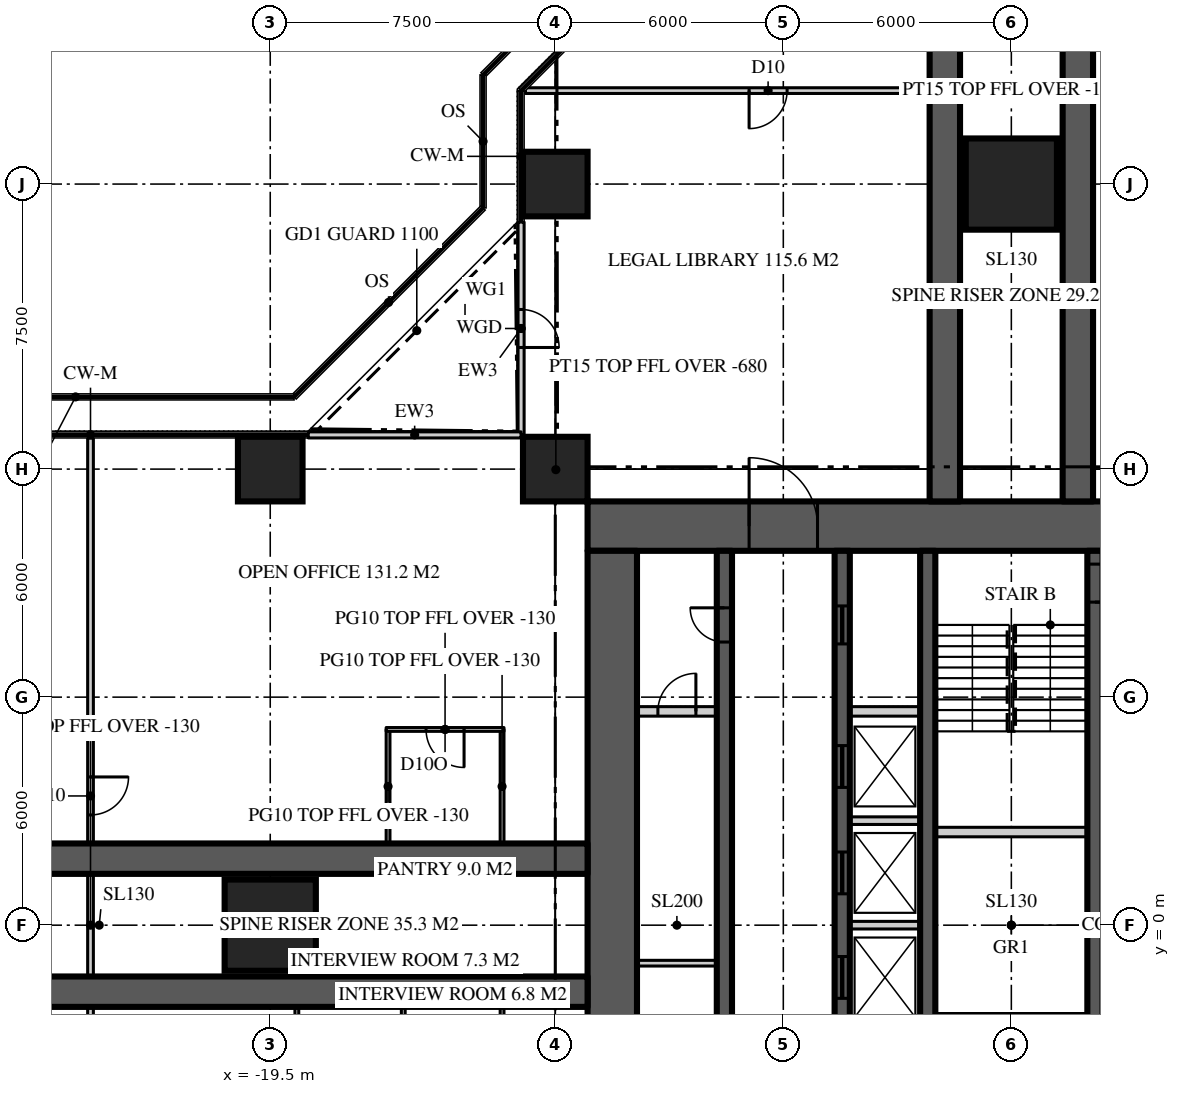
"""IFC4 building model, lengths in metres.
Left out: names, types, materials, properties, quantities, classifications, styles, units other than length and angle.
Written with IfcOpenShell. Run it as: python <this file> out.ifc"""

import sys

from ifc_helpers import new_model, si_unit, direction, frame, frame_2d, origin, origin_2d, place, context, subcontext, project, spatial, rectangle, extrude, element, fill, save


model = new_model("IFC4")
c1 = context("Model", 3, precision=1e-05, world=origin(), true_north=direction((0.0, 1.0)))
c2 = subcontext(c1, "Body", "Model", "MODEL_VIEW")
j1 = project(units=[si_unit("LENGTHUNIT", "METRE"), si_unit("PLANEANGLEUNIT", "RADIAN")], contexts=[c1])
p1 = place(None, origin())
s1 = spatial("IfcSite", under=j1, at=p1, CompositionType="ELEMENT")
p2 = place(p1, origin())
s2 = spatial("IfcBuilding", under=s1, at=p2, CompositionType="ELEMENT")
p3 = place(p2, frame((0.0, 0.0, 143.7)))
s3 = spatial("IfcBuildingStorey", under=s2, at=p3, CompositionType="ELEMENT", Elevation=143.7)
p4 = place(p3, frame((-11.15, 10.5, 0.0), z_axis=(0.0, 0.0, 1.0), x_axis=(1.0, 0.0, 0.0)))
e1 = element("IfcWall", 1, at=p4, inside=s3, PredefinedType="SHEAR", context=c2, shape_type="SweptSolid", body=[
    extrude(rectangle(XDim=22.3, YDim=1.3, at=frame_2d((11.15, 0.0))), origin(), (0.0, 0.0, 1.0), 3.9),
])
p5 = place(p4, frame((4.25, 0.0, 0.0)))
e2 = element("IfcOpeningElement", 2, at=p5, cuts=e1, PredefinedType="OPENING", context=c2, shape_type="SweptSolid", body=[
    extrude(rectangle(XDim=1.8, YDim=2.2, at=frame_2d((0.9, 1.1))), frame((0.0, 0.66, 0.0), z_axis=(0.0, -1.0, 0.0), x_axis=(1.0, 0.0, 0.0)), (0.0, 0.0, 1.0), 1.32),
])
p6 = place(p4, frame((16.25, 0.0, 0.0)))
e3 = element("IfcOpeningElement", 3, at=p6, cuts=e1, PredefinedType="OPENING", context=c2, shape_type="SweptSolid", body=[
    extrude(rectangle(XDim=1.8, YDim=2.2, at=frame_2d((0.9, 1.1))), frame((0.0, 0.66, 0.0), z_axis=(0.0, -1.0, 0.0), x_axis=(1.0, 0.0, 0.0)), (0.0, 0.0, 1.0), 1.32),
])
p7 = place(p3, frame((-10.5, 9.85, 0.0), z_axis=(0.0, 0.0, 1.0), x_axis=(0.0, -1.0, 0.0)))
e4 = element("IfcWall", 4, at=p7, inside=s3, PredefinedType="SHEAR", context=c2, shape_type="SweptSolid", body=[
    extrude(rectangle(XDim=19.7, YDim=1.3, at=frame_2d((9.85, 0.0))), origin(), (0.0, 0.0, 1.0), 3.9),
])
p8 = place(p7, frame((17.25, 0.0, 0.0)))
e5 = element("IfcOpeningElement", 5, at=p8, cuts=e4, PredefinedType="OPENING", context=c2, shape_type="SweptSolid", body=[
    extrude(rectangle(XDim=1.0, YDim=2.2, at=frame_2d((0.5, 1.1))), frame((0.0, 0.66, 0.0), z_axis=(0.0, -1.0, 0.0), x_axis=(1.0, 0.0, 0.0)), (0.0, 0.0, 1.0), 1.32),
])
for number, where, z_axis, x_axis in (
    (6, (1.75, 11.15, 0.0), (0.0, 0.0, 1.0), (0.0, 1.0, 0.0)),
    (7, (-1.75, 11.15, 0.0), (0.0, 0.0, 1.0), (0.0, 1.0, 0.0)),
    (8, (-11.15, 1.75, 0.0), (0.0, 0.0, 1.0), (-1.0, 0.0, 0.0)),
    (9, (-11.15, -1.75, 0.0), (0.0, 0.0, 1.0), (-1.0, 0.0, 0.0)),
):
    element("IfcWall", number, at=place(p3, frame(where, z_axis=z_axis, x_axis=x_axis)), inside=s3, PredefinedType="SHEAR", context=c2, shape_type="SweptSolid", body=[
        extrude(rectangle(XDim=15.25, YDim=0.8, at=frame_2d((7.625, 0.0))), origin(), (0.0, 0.0, 1.0), 3.9),
    ])
p9 = place(p3, frame((-19.5, 0.0, 0.0), z_axis=(0.0, 0.0, 1.0), x_axis=(1.0, 0.0, 0.0)))
e10 = element("IfcColumn", 10, at=p9, inside=s3, PredefinedType="COLUMN", context=c2, shape_type="SweptSolid", body=[
    extrude(rectangle(XDim=2.4, YDim=2.4, at=origin_2d()), origin(), (0.0, 0.0, 1.0), 3.9),
])
for number, where, z_axis, x_axis in (
    (11, (-19.5, 12.0, 0.0), (0.0, 0.0, 1.0), (1.0, 0.0, 0.0)),
    (12, (-12.0, 12.0, 0.0), (0.0, 0.0, 1.0), (1.0, 0.0, 0.0)),
    (13, (-12.0, 19.5, 0.0), (0.0, 0.0, 1.0), (1.0, 0.0, 0.0)),
):
    element("IfcColumn", number, at=place(p3, frame(where, z_axis=z_axis, x_axis=x_axis)), inside=s3, PredefinedType="COLUMN", context=c2, shape_type="SweptSolid", body=[
        extrude(rectangle(XDim=1.7, YDim=1.7, at=origin_2d()), origin(), (0.0, 0.0, 1.0), 3.9),
    ])
p10 = place(p3, frame((0.0, 19.5, 0.0), z_axis=(0.0, 0.0, 1.0), x_axis=(1.0, 0.0, 0.0)))
e14 = element("IfcColumn", 14, at=p10, inside=s3, PredefinedType="COLUMN", context=c2, shape_type="SweptSolid", body=[
    extrude(rectangle(XDim=2.4, YDim=2.4, at=origin_2d()), origin(), (0.0, 0.0, 1.0), 3.9),
])
p11 = place(p3, frame((-12.9, 18.5, 0.0), z_axis=(0.0, 0.0, 1.0), x_axis=(0.0, -1.0, 0.0)))
e15 = element("IfcWall", 15, at=p11, inside=s3, PredefinedType="SOLIDWALL", context=c2, shape_type="SweptSolid", body=[
    extrude(rectangle(XDim=5.6, YDim=0.16, at=frame_2d((2.8, 0.0))), origin(), (0.0, 0.0, 1.0), 3.77),
])
p12 = place(p11, frame((2.3, 0.0, 0.0)))
e16 = element("IfcOpeningElement", 16, at=p12, cuts=e15, PredefinedType="OPENING", context=c2, shape_type="SweptSolid", body=[
    extrude(rectangle(XDim=1.0, YDim=2.2, at=frame_2d((0.5, 1.1))), frame((0.0, 0.09, 0.0), z_axis=(0.0, -1.0, 0.0), x_axis=(1.0, 0.0, 0.0)), (0.0, 0.0, 1.0), 0.18),
])
p13 = place(p3, frame((-12.9, 12.9, 0.0), z_axis=(0.0, 0.0, 1.0), x_axis=(-1.0, 0.0, 0.0)))
e17 = element("IfcWall", 17, at=p13, inside=s3, PredefinedType="SOLIDWALL", context=c2, shape_type="SweptSolid", body=[
    extrude(rectangle(XDim=5.6, YDim=0.16, at=frame_2d((2.8, 0.0))), origin(), (0.0, 0.0, 1.0), 3.77),
])
p14 = place(p3, frame((-7.55, -9.85, 0.0), z_axis=(0.0, 0.0, 1.0), x_axis=(0.0, 1.0, 0.0)))
e18 = element("IfcWall", 18, at=p14, inside=s3, PredefinedType="SHEAR", context=c2, shape_type="SweptSolid", body=[
    extrude(rectangle(XDim=19.7, YDim=0.4, at=frame_2d((9.85, 0.0))), origin(), (0.0, 0.0, 1.0), 3.9),
])
p15 = place(p14, frame((1.45, 0.0, 0.0)))
e19 = element("IfcOpeningElement", 19, at=p15, cuts=e18, PredefinedType="OPENING", context=c2, shape_type="SweptSolid", body=[
    extrude(rectangle(XDim=1.0, YDim=2.2, at=frame_2d((0.5, 1.1))), frame((0.0, 0.21, 0.0), z_axis=(0.0, -1.0, 0.0), x_axis=(1.0, 0.0, 0.0)), (0.0, 0.0, 1.0), 0.42),
])
p16 = place(p14, frame((17.3, 0.0, 0.0)))
e20 = element("IfcOpeningElement", 20, at=p16, cuts=e18, PredefinedType="OPENING", context=c2, shape_type="SweptSolid", body=[
    extrude(rectangle(XDim=0.9, YDim=2.1, at=frame_2d((0.45, 1.05))), frame((0.0, 0.21, 0.0), z_axis=(0.0, -1.0, 0.0), x_axis=(1.0, 0.0, 0.0)), (0.0, 0.0, 1.0), 0.42),
])
p17 = place(p3, frame((-4.45, -9.85, 0.0), z_axis=(0.0, 0.0, 1.0), x_axis=(0.0, 1.0, 0.0)))
e21 = element("IfcWall", 21, at=p17, inside=s3, PredefinedType="SHEAR", context=c2, shape_type="SweptSolid", body=[
    extrude(rectangle(XDim=19.7, YDim=0.4, at=frame_2d((9.85, 0.0))), origin(), (0.0, 0.0, 1.0), 3.9),
])
p18 = place(p17, frame((1.95, 0.0, 0.0)))
e22 = element("IfcOpeningElement", 22, at=p18, cuts=e21, PredefinedType="OPENING", context=c2, shape_type="SweptSolid", body=[
    extrude(rectangle(XDim=1.0, YDim=2.2, at=frame_2d((0.5, 1.1))), frame((0.0, 0.21, 0.0), z_axis=(0.0, -1.0, 0.0), x_axis=(1.0, 0.0, 0.0)), (0.0, 0.0, 1.0), 0.42),
])
p19 = place(p17, frame((17.25, 0.0, 0.0)))
e23 = element("IfcOpeningElement", 23, at=p19, cuts=e21, PredefinedType="OPENING", context=c2, shape_type="SweptSolid", body=[
    extrude(rectangle(XDim=1.0, YDim=2.1, at=frame_2d((0.5, 1.05))), frame((0.0, 0.21, 0.0), z_axis=(0.0, -1.0, 0.0), x_axis=(1.0, 0.0, 0.0)), (0.0, 0.0, 1.0), 0.42),
])
p20 = place(p17, frame((7.925, 0.0, 0.0)))
e24 = element("IfcOpeningElement", 24, at=p20, cuts=e21, PredefinedType="OPENING", context=c2, shape_type="SweptSolid", body=[
    extrude(rectangle(XDim=1.1, YDim=2.2, at=frame_2d((0.55, 1.1))), frame((0.0, 0.21, 0.0), z_axis=(0.0, -1.0, 0.0), x_axis=(1.0, 0.0, 0.0)), (0.0, 0.0, 1.0), 0.42),
])
p21 = place(p17, frame((10.675, 0.0, 0.0)))
e25 = element("IfcOpeningElement", 25, at=p21, cuts=e21, PredefinedType="OPENING", context=c2, shape_type="SweptSolid", body=[
    extrude(rectangle(XDim=1.1, YDim=2.2, at=frame_2d((0.55, 1.1))), frame((0.0, 0.21, 0.0), z_axis=(0.0, -1.0, 0.0), x_axis=(1.0, 0.0, 0.0)), (0.0, 0.0, 1.0), 0.42),
])
p22 = place(p17, frame((13.475, 0.0, 0.0)))
e26 = element("IfcOpeningElement", 26, at=p22, cuts=e21, PredefinedType="OPENING", context=c2, shape_type="SweptSolid", body=[
    extrude(rectangle(XDim=1.1, YDim=2.2, at=frame_2d((0.55, 1.1))), frame((0.0, 0.21, 0.0), z_axis=(0.0, -1.0, 0.0), x_axis=(1.0, 0.0, 0.0)), (0.0, 0.0, 1.0), 0.42),
])
p23 = place(p3, frame((-2.2, -9.85, 0.0), z_axis=(0.0, 0.0, 1.0), x_axis=(0.0, 1.0, 0.0)))
e27 = element("IfcWall", 27, at=p23, inside=s3, PredefinedType="SHEAR", context=c2, shape_type="SweptSolid", body=[
    extrude(rectangle(XDim=19.7, YDim=0.4, at=frame_2d((9.85, 0.0))), origin(), (0.0, 0.0, 1.0), 3.9),
])
p24 = place(p23, frame((0.35, 0.0, 0.0)))
e28 = element("IfcOpeningElement", 28, at=p24, cuts=e27, PredefinedType="OPENING", context=c2, shape_type="SweptSolid", body=[
    extrude(rectangle(XDim=1.0, YDim=2.2, at=frame_2d((0.5, 1.1))), frame((0.0, 0.21, 0.0), z_axis=(0.0, -1.0, 0.0), x_axis=(1.0, 0.0, 0.0)), (0.0, 0.0, 1.0), 0.42),
])
p25 = place(p3, frame((2.2, 9.85, 0.0), z_axis=(0.0, 0.0, 1.0), x_axis=(0.0, -1.0, 0.0)))
e29 = element("IfcWall", 29, at=p25, inside=s3, PredefinedType="SHEAR", context=c2, shape_type="SweptSolid", body=[
    extrude(rectangle(XDim=19.7, YDim=0.4, at=frame_2d((9.85, 0.0))), origin(), (0.0, 0.0, 1.0), 3.9),
])
p26 = place(p25, frame((0.35, 0.0, 0.0)))
e30 = element("IfcOpeningElement", 30, at=p26, cuts=e29, PredefinedType="OPENING", context=c2, shape_type="SweptSolid", body=[
    extrude(rectangle(XDim=1.0, YDim=2.2, at=frame_2d((0.5, 1.1))), frame((0.0, 0.21, 0.0), z_axis=(0.0, -1.0, 0.0), x_axis=(1.0, 0.0, 0.0)), (0.0, 0.0, 1.0), 0.42),
])
p27 = place(p3, frame((-9.85, 5.625, 0.0), z_axis=(0.0, 0.0, 1.0), x_axis=(1.0, 0.0, 0.0)))
e31 = element("IfcWall", 31, at=p27, inside=s3, PredefinedType="SOLIDWALL", context=c2, shape_type="SweptSolid", body=[
    extrude(rectangle(XDim=2.1, YDim=0.25, at=frame_2d((1.05, 0.0))), origin(), (0.0, 0.0, 1.0), 3.7),
])
p28 = place(p27, frame((0.55, 0.0, 0.0)))
e32 = element("IfcOpeningElement", 32, at=p28, cuts=e31, PredefinedType="OPENING", context=c2, shape_type="SweptSolid", body=[
    extrude(rectangle(XDim=1.0, YDim=2.2, at=frame_2d((0.5, 1.1))), frame((0.0, 0.135, 0.0), z_axis=(0.0, -1.0, 0.0), x_axis=(1.0, 0.0, 0.0)), (0.0, 0.0, 1.0), 0.27),
])
p29 = place(p3, frame((-4.25, 5.625, 0.0), z_axis=(0.0, 0.0, 1.0), x_axis=(1.0, 0.0, 0.0)))
e33 = element("IfcWall", 33, at=p29, inside=s3, PredefinedType="SOLIDWALL", context=c2, shape_type="SweptSolid", body=[
    extrude(rectangle(XDim=1.85, YDim=0.25, at=frame_2d((0.925, 0.0))), origin(), (0.0, 0.0, 1.0), 3.7),
])
for number, where, z_axis, x_axis in (
    (34, (-2.0, -2.45, 0.0), (0.0, 0.0, 1.0), (1.0, 0.0, 0.0)),
    (35, (-2.0, 2.45, 0.0), (0.0, 0.0, 1.0), (1.0, 0.0, 0.0)),
):
    element("IfcWall", number, at=place(p3, frame(where, z_axis=z_axis, x_axis=x_axis)), inside=s3, PredefinedType="SOLIDWALL", context=c2, shape_type="SweptSolid", body=[
        extrude(rectangle(XDim=4.0, YDim=0.25, at=frame_2d((2.0, 0.0))), origin(), (0.0, 0.0, 1.0), 3.7),
    ])
for number, where, z_axis, x_axis in (
    (36, (-4.25, 0.0, 0.0), (0.0, 0.0, 1.0), (1.0, 0.0, 0.0)),
    (37, (-4.25, 2.75, 0.0), (0.0, 0.0, 1.0), (1.0, 0.0, 0.0)),
):
    element("IfcWall", number, at=place(p3, frame(where, z_axis=z_axis, x_axis=x_axis)), inside=s3, PredefinedType="SOLIDWALL", context=c2, shape_type="SweptSolid", body=[
        extrude(rectangle(XDim=1.85, YDim=0.2, at=frame_2d((0.925, 0.0))), origin(), (0.0, 0.0, 1.0), 3.7),
    ])
p30 = place(p3, frame((12.786, 21.959, 0.0), z_axis=(0.0, 0.0, 1.0), x_axis=(-1.0, 0.0, 0.0)))
e38 = element("IfcWall", 38, at=p30, inside=s3, PredefinedType="PARTITIONING", context=c2, shape_type="SweptSolid", body=[
    extrude(rectangle(XDim=25.573, YDim=0.15, at=frame_2d((12.786, 0.0))), origin(), (0.0, 0.0, 1.0), 3.77),
])
p31 = place(p30, frame((18.687, 0.0, 0.0)))
e39 = element("IfcOpeningElement", 39, at=p31, cuts=e38, PredefinedType="OPENING", context=c2, shape_type="SweptSolid", body=[
    extrude(rectangle(XDim=1.0, YDim=2.2, at=frame_2d((0.5, 1.1))), frame((0.0, 0.085, 0.0), z_axis=(0.0, -1.0, 0.0), x_axis=(1.0, 0.0, 0.0)), (0.0, 0.0, 1.0), 0.17),
])
p32 = place(p30, frame((5.886, 0.0, 0.0)))
e40 = element("IfcOpeningElement", 40, at=p32, cuts=e38, PredefinedType="OPENING", context=c2, shape_type="SweptSolid", body=[
    extrude(rectangle(XDim=1.0, YDim=2.2, at=frame_2d((0.5, 1.1))), frame((0.0, 0.085, 0.0), z_axis=(0.0, -1.0, 0.0), x_axis=(1.0, 0.0, 0.0)), (0.0, 0.0, 1.0), 0.17),
])
p33 = place(p3, frame((-24.229, 12.82, 0.0), z_axis=(0.0, 0.0, 1.0), x_axis=(0.0, -1.0, 0.0)))
e41 = element("IfcWall", 41, at=p33, inside=s3, PredefinedType="PARTITIONING", context=c2, shape_type="SweptSolid", body=[
    extrude(rectangle(XDim=25.64, YDim=0.15, at=frame_2d((12.82, 0.0))), origin(), (0.0, 0.0, 1.0), 3.77),
])
p34 = place(p33, frame((15.72, 0.0, 0.0)))
e42 = element("IfcOpeningElement", 42, at=p34, cuts=e41, PredefinedType="OPENING", context=c2, shape_type="SweptSolid", body=[
    extrude(rectangle(XDim=1.0, YDim=2.2, at=frame_2d((0.5, 1.1))), frame((0.0, 0.085, 0.0), z_axis=(0.0, -1.0, 0.0), x_axis=(1.0, 0.0, 0.0)), (0.0, 0.0, 1.0), 0.17),
])
p35 = place(p33, frame((8.92, 0.0, 0.0)))
e43 = element("IfcOpeningElement", 43, at=p35, cuts=e41, PredefinedType="OPENING", context=c2, shape_type="SweptSolid", body=[
    extrude(rectangle(XDim=1.0, YDim=2.2, at=frame_2d((0.5, 1.1))), frame((0.0, 0.085, 0.0), z_axis=(0.0, -1.0, 0.0), x_axis=(1.0, 0.0, 0.0)), (0.0, 0.0, 1.0), 0.17),
])
for number, where, z_axis, x_axis in (
    (44, (-13.4, -2.15, 0.0), (0.0, 0.0, 1.0), (0.0, -1.0, 0.0)),
    (45, (-16.0, -2.15, 0.0), (0.0, 0.0, 1.0), (0.0, -1.0, 0.0)),
    (46, (-18.8, -2.15, 0.0), (0.0, 0.0, 1.0), (0.0, -1.0, 0.0)),
):
    element("IfcWall", number, at=place(p3, frame(where, z_axis=z_axis, x_axis=x_axis)), inside=s3, PredefinedType="PARTITIONING", context=c2, shape_type="SweptSolid", body=[
        extrude(rectangle(XDim=2.6, YDim=0.1, at=frame_2d((1.3, 0.0))), origin(), (0.0, 0.0, 1.0), 3.77),
    ])
for number, where, z_axis, x_axis in (
    (47, (-13.4, 2.15, 0.0), (0.0, 0.0, 1.0), (0.0, 1.0, 0.0)),
    (48, (-16.4, 2.15, 0.0), (0.0, 0.0, 1.0), (0.0, 1.0, 0.0)),
):
    element("IfcWall", number, at=place(p3, frame(where, z_axis=z_axis, x_axis=x_axis)), inside=s3, PredefinedType="PARTITIONING", context=c2, shape_type="SweptSolid", body=[
        extrude(rectangle(XDim=3.0, YDim=0.1, at=frame_2d((1.5, 0.0))), origin(), (0.0, 0.0, 1.0), 3.77),
    ])
p36 = place(p3, frame((-13.35, 5.15, 0.0), z_axis=(0.0, 0.0, 1.0), x_axis=(-1.0, 0.0, 0.0)))
e49 = element("IfcWall", 49, at=p36, inside=s3, PredefinedType="PARTITIONING", context=c2, shape_type="SweptSolid", body=[
    extrude(rectangle(XDim=3.1, YDim=0.1, at=frame_2d((1.55, 0.0))), origin(), (0.0, 0.0, 1.0), 3.77),
])
p37 = place(p36, frame((1.05, 0.0, 0.0)))
e50 = element("IfcOpeningElement", 50, at=p37, cuts=e49, PredefinedType="OPENING", context=c2, shape_type="SweptSolid", body=[
    extrude(rectangle(XDim=1.0, YDim=2.2, at=frame_2d((0.5, 1.1))), frame((0.0, 0.06, 0.0), z_axis=(0.0, -1.0, 0.0), x_axis=(1.0, 0.0, 0.0)), (0.0, 0.0, 1.0), 0.12),
])
p38 = place(p3, frame((-11.15, 11.15, 0.0), z_axis=(0.0, 0.0, 1.0), x_axis=(-0.707106781187, 0.707106781187, 0.0)))
e51 = element("IfcWall", 51, at=p38, inside=s3, PredefinedType="PARTITIONING", context=c2, shape_type="SweptSolid", body=[
    extrude(rectangle(XDim=2.362, YDim=0.15, at=frame_2d((1.181, 0.0))), origin(), (0.0, 0.0, 1.0), 3.22),
])
p39 = place(p3, frame((-9.85, -1.0, 0.0), z_axis=(0.0, 0.0, 1.0), x_axis=(1.0, 0.0, 0.0)))
e52 = element("IfcWall", 52, at=p39, inside=s3, PredefinedType="SOLIDWALL", context=c2, shape_type="SweptSolid", body=[
    extrude(rectangle(XDim=2.1, YDim=0.15, at=frame_2d((1.05, 0.0))), origin(), (0.0, 0.0, 1.0), 3.77),
])
p40 = place(p12, origin())
e53 = element("IfcDoor", 53, at=p40, inside=s3, OperationType="SINGLE_SWING_RIGHT", PredefinedType="DOOR", context=c2, shape_type="SweptSolid", body=[
    extrude(rectangle(XDim=1.0, YDim=2.2, at=frame_2d((0.5, 1.1))), frame((0.0, 0.025, 0.0), z_axis=(0.0, -1.0, 0.0), x_axis=(1.0, 0.0, 0.0)), (0.0, 0.0, 1.0), 0.05),
])
fill(e16, e53)
p41 = place(p5, origin())
e54 = element("IfcDoor", 54, at=p41, inside=s3, OperationType="DOUBLE_DOOR_DOUBLE_SWING", PredefinedType="DOOR", context=c2, shape_type="SweptSolid", body=[
    extrude(rectangle(XDim=1.8, YDim=2.2, at=frame_2d((0.9, 1.1))), frame((0.0, 0.025, 0.0), z_axis=(0.0, -1.0, 0.0), x_axis=(1.0, 0.0, 0.0)), (0.0, 0.0, 1.0), 0.05),
])
fill(e2, e54)
p42 = place(p26, origin())
e55 = element("IfcDoor", 55, at=p42, inside=s3, OperationType="SINGLE_SWING_RIGHT", PredefinedType="DOOR", context=c2, shape_type="SweptSolid", body=[
    extrude(rectangle(XDim=1.0, YDim=2.2, at=frame_2d((0.5, 1.1))), frame((0.0, 0.025, 0.0), z_axis=(0.0, -1.0, 0.0), x_axis=(1.0, 0.0, 0.0)), (0.0, 0.0, 1.0), 0.05),
])
fill(e30, e55)
p43 = place(p16, origin())
e56 = element("IfcDoor", 56, at=p43, inside=s3, OperationType="SINGLE_SWING_RIGHT", PredefinedType="DOOR", context=c2, shape_type="SweptSolid", body=[
    extrude(rectangle(XDim=0.9, YDim=2.1, at=frame_2d((0.45, 1.05))), frame((0.0, 0.025, 0.0), z_axis=(0.0, -1.0, 0.0), x_axis=(1.0, 0.0, 0.0)), (0.0, 0.0, 1.0), 0.05),
])
fill(e20, e56)
p44 = place(p19, origin())
e57 = element("IfcDoor", 57, at=p44, inside=s3, OperationType="SLIDING_TO_LEFT", PredefinedType="DOOR", context=c2, shape_type="SweptSolid", body=[
    extrude(rectangle(XDim=1.0, YDim=2.1, at=frame_2d((0.5, 1.05))), frame((0.0, 0.025, 0.0), z_axis=(0.0, -1.0, 0.0), x_axis=(1.0, 0.0, 0.0)), (0.0, 0.0, 1.0), 0.05),
])
fill(e23, e57)
p45 = place(p20, origin())
e58 = element("IfcDoor", 58, at=p45, inside=s3, OperationType="SLIDING_TO_LEFT", PredefinedType="DOOR", context=c2, shape_type="SweptSolid", body=[
    extrude(rectangle(XDim=1.1, YDim=2.2, at=frame_2d((0.55, 1.1))), frame((0.0, 0.025, 0.0), z_axis=(0.0, -1.0, 0.0), x_axis=(1.0, 0.0, 0.0)), (0.0, 0.0, 1.0), 0.05),
])
fill(e24, e58)
p46 = place(p21, origin())
e59 = element("IfcDoor", 59, at=p46, inside=s3, OperationType="SLIDING_TO_LEFT", PredefinedType="DOOR", context=c2, shape_type="SweptSolid", body=[
    extrude(rectangle(XDim=1.1, YDim=2.2, at=frame_2d((0.55, 1.1))), frame((0.0, 0.025, 0.0), z_axis=(0.0, -1.0, 0.0), x_axis=(1.0, 0.0, 0.0)), (0.0, 0.0, 1.0), 0.05),
])
fill(e25, e59)
p47 = place(p22, origin())
e60 = element("IfcDoor", 60, at=p47, inside=s3, OperationType="SLIDING_TO_LEFT", PredefinedType="DOOR", context=c2, shape_type="SweptSolid", body=[
    extrude(rectangle(XDim=1.1, YDim=2.2, at=frame_2d((0.55, 1.1))), frame((0.0, 0.025, 0.0), z_axis=(0.0, -1.0, 0.0), x_axis=(1.0, 0.0, 0.0)), (0.0, 0.0, 1.0), 0.05),
])
fill(e26, e60)
p48 = place(p31, origin())
e61 = element("IfcDoor", 61, at=p48, inside=s3, OperationType="SINGLE_SWING_RIGHT", PredefinedType="DOOR", context=c2, shape_type="SweptSolid", body=[
    extrude(rectangle(XDim=1.0, YDim=2.2, at=frame_2d((0.5, 1.1))), frame((0.0, 0.025, 0.0), z_axis=(0.0, -1.0, 0.0), x_axis=(1.0, 0.0, 0.0)), (0.0, 0.0, 1.0), 0.05),
])
fill(e39, e61)
p49 = place(p35, origin())
e62 = element("IfcDoor", 62, at=p49, inside=s3, OperationType="SINGLE_SWING_LEFT", PredefinedType="DOOR", context=c2, shape_type="SweptSolid", body=[
    extrude(rectangle(XDim=1.0, YDim=2.2, at=frame_2d((0.5, 1.1))), frame((0.0, 0.025, 0.0), z_axis=(0.0, -1.0, 0.0), x_axis=(1.0, 0.0, 0.0)), (0.0, 0.0, 1.0), 0.05),
])
fill(e43, e62)
p50 = place(p37, origin())
e63 = element("IfcDoor", 63, at=p50, inside=s3, OperationType="SINGLE_SWING_LEFT", PredefinedType="DOOR", context=c2, shape_type="SweptSolid", body=[
    extrude(rectangle(XDim=1.0, YDim=2.2, at=frame_2d((0.5, 1.1))), frame((0.0, 0.025, 0.0), z_axis=(0.0, -1.0, 0.0), x_axis=(1.0, 0.0, 0.0)), (0.0, 0.0, 1.0), 0.05),
])
fill(e50, e63)
p51 = place(p28, origin())
e64 = element("IfcDoor", 64, at=p51, inside=s3, OperationType="SINGLE_SWING_RIGHT", PredefinedType="DOOR", context=c2, shape_type="SweptSolid", body=[
    extrude(rectangle(XDim=1.0, YDim=2.2, at=frame_2d((0.5, 1.1))), frame((0.0, 0.025, 0.0), z_axis=(0.0, -1.0, 0.0), x_axis=(1.0, 0.0, 0.0)), (0.0, 0.0, 1.0), 0.05),
])
fill(e32, e64)
save(model, sys.argv[1])
